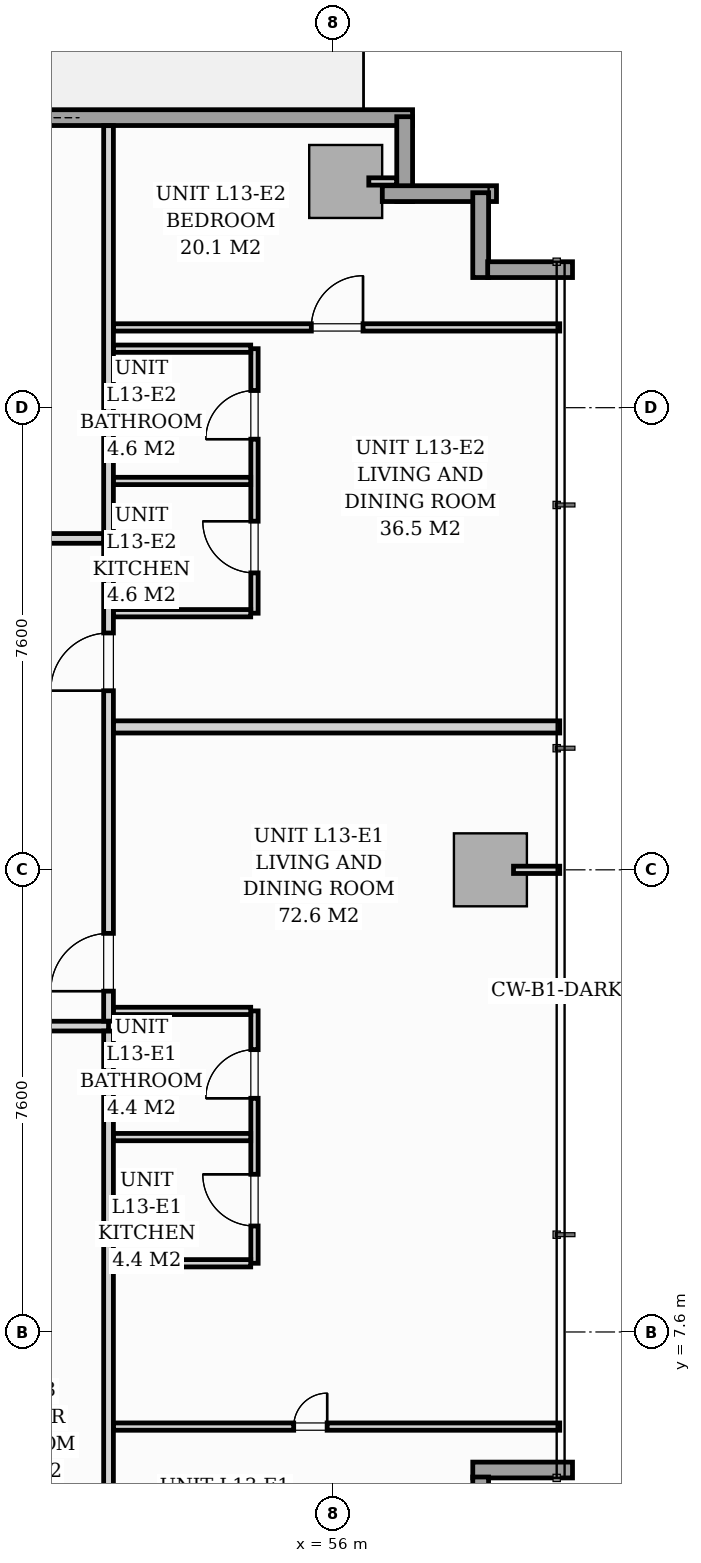
"""IFC4 building model, lengths in metres.
Left out: names, types, materials, properties, quantities, classifications, styles, units other than length and angle.
Written with IfcOpenShell. Run it as: python <this file> out.ifc"""

import sys

from ifc_helpers import new_model, si_unit, direction, frame, frame_2d, origin, origin_2d, place, context, subcontext, project, spatial, rectangle, extrude, source, transform, mapped, element, fill, save


model = new_model("IFC4")
c1 = context("Model", 3, precision=1e-05, world=origin(), true_north=direction((0.0, 1.0)))
c2 = subcontext(c1, "Body", "Model", "MODEL_VIEW")
j1 = project(units=[si_unit("LENGTHUNIT", "METRE"), si_unit("PLANEANGLEUNIT", "RADIAN")], contexts=[c1])
p1 = place(None, origin())
s1 = spatial("IfcSite", under=j1, at=p1, CompositionType="ELEMENT")
p2 = place(p1, origin())
s2 = spatial("IfcBuilding", under=s1, at=p2, CompositionType="ELEMENT")
p3 = place(p2, frame((0.0, 0.0, 48.6)))
s3 = spatial("IfcBuildingStorey", under=s2, at=p3, CompositionType="ELEMENT", Elevation=48.6)
m1 = source(origin(), c2, "Body", "SweptSolid", [
    extrude(rectangle(XDim=1.2, YDim=1.2, at=origin_2d()), origin(), (0.0, 0.0, 1.0), 3.196),
])
for number, where, z_axis, x_axis in (
    (1, (56.2, 26.52, 0.002), (0.0, 0.0, 1.0), (1.0, 0.0, 0.0)),
    (2, (58.58, 15.2, 0.002), (0.0, 0.0, 1.0), (1.0, 0.0, 0.0)),
):
    element("IfcColumn", number, at=place(p3, frame(where, z_axis=z_axis, x_axis=x_axis)), inside=s3, PredefinedType="COLUMN", context=c2, shape_type="MappedRepresentation", body=[
        mapped(m1, transform((0.0, 0.0, 0.0), scale=1.0)),
    ])
p4 = place(p3, frame((40.15, 27.57, 0.0), z_axis=(0.0, 0.0, 1.0), x_axis=(1.0, 0.0, 0.0)))
e3 = element("IfcWall", 3, at=p4, inside=s3, PredefinedType="STANDARD", context=c2, shape_type="SweptSolid", body=[
    extrude(rectangle(XDim=17.15, YDim=0.26, at=frame_2d((8.575, 0.0))), origin(), (0.0, 0.0, 1.0), 2.94),
])
p5 = place(p4, frame((9.06, 0.0, 0.0)))
e4 = element("IfcOpeningElement", 4, at=p5, cuts=e3, PredefinedType="OPENING", context=c2, shape_type="SweptSolid", body=[
    extrude(rectangle(XDim=1.8, YDim=2.06, at=frame_2d((0.9, 1.03))), frame((0.0, 0.14, 0.0), z_axis=(0.0, -1.0, 0.0), x_axis=(1.0, 0.0, 0.0)), (0.0, 0.0, 1.0), 0.28),
])
p6 = place(p4, frame((0.7, 0.0, 0.65)))
e5 = element("IfcOpeningElement", 5, at=p6, cuts=e3, PredefinedType="OPENING", context=c2, shape_type="SweptSolid", body=[
    extrude(rectangle(XDim=1.6, YDim=1.5, at=frame_2d((0.8, 0.75))), frame((0.0, 0.14, 0.0), z_axis=(0.0, -1.0, 0.0), x_axis=(1.0, 0.0, 0.0)), (0.0, 0.0, 1.0), 0.28),
])
p7 = place(p3, frame((57.17, 27.585, 0.0), z_axis=(0.0, 0.0, 1.0), x_axis=(0.0, -1.0, 0.0)))
e6 = element("IfcWall", 6, at=p7, inside=s3, PredefinedType="STANDARD", context=c2, shape_type="SweptSolid", body=[
    extrude(rectangle(XDim=1.395, YDim=0.26, at=frame_2d((0.698, 0.0))), origin(), (0.0, 0.0, 1.0), 2.94),
])
p8 = place(p3, frame((56.802, 26.32, 0.0), z_axis=(0.0, 0.0, 1.0), x_axis=(1.0, 0.0, 0.0)))
e7 = element("IfcWall", 7, at=p8, inside=s3, PredefinedType="STANDARD", context=c2, shape_type="SweptSolid", body=[
    extrude(rectangle(XDim=1.878, YDim=0.26, at=frame_2d((0.939, 0.0))), origin(), (0.0, 0.0, 1.0), 2.94),
])
for number, where, z_axis, x_axis in (
    (8, (58.42, 26.335, 0.0), (0.0, 0.0, 1.0), (0.0, -1.0, 0.0)),
    (9, (58.535, 25.07, 0.0), (0.0, 0.0, 1.0), (1.0, 0.0, 0.0)),
):
    element("IfcWall", number, at=place(p3, frame(where, z_axis=z_axis, x_axis=x_axis)), inside=s3, PredefinedType="STANDARD", context=c2, shape_type="SweptSolid", body=[
        extrude(rectangle(XDim=1.395, YDim=0.26, at=frame_2d((0.698, 0.0))), origin(), (0.0, 0.0, 1.0), 2.94),
    ])
p9 = place(p3, frame((59.93, 5.33, 0.0), z_axis=(0.0, 0.0, 1.0), x_axis=(-1.0, 0.0, 0.0)))
e10 = element("IfcWall", 10, at=p9, inside=s3, PredefinedType="STANDARD", context=c2, shape_type="SweptSolid", body=[
    extrude(rectangle(XDim=1.64, YDim=0.26, at=frame_2d((0.82, 0.0))), origin(), (0.0, 0.0, 1.0), 2.94),
])
p10 = place(p3, frame((58.42, 5.215, 0.0), z_axis=(0.0, 0.0, 1.0), x_axis=(0.0, -1.0, 0.0)))
e11 = element("IfcWall", 11, at=p10, inside=s3, PredefinedType="STANDARD", context=c2, shape_type="SweptSolid", body=[
    extrude(rectangle(XDim=1.15, YDim=0.26, at=frame_2d((0.575, 0.0))), origin(), (0.0, 0.0, 1.0), 2.94),
])
p11 = place(p3, frame((15.2, 12.63, 0.0), z_axis=(0.0, 0.0, 1.0), x_axis=(1.0, 0.0, 0.0)))
e12 = element("IfcWall", 12, at=p11, inside=s3, PredefinedType="PARTITIONING", context=c2, shape_type="SweptSolid", body=[
    extrude(rectangle(XDim=37.1, YDim=0.16, at=frame_2d((18.55, 0.0))), origin(), (0.0, 0.0, 1.0), 2.94),
])
p12 = place(p11, frame((1.572, 0.0, 0.0)))
e13 = element("IfcOpeningElement", 13, at=p12, cuts=e12, PredefinedType="OPENING", context=c2, shape_type="SweptSolid", body=[
    extrude(rectangle(XDim=0.95, YDim=2.06, at=frame_2d((0.475, 1.03))), frame((0.0, 0.09, 0.0), z_axis=(0.0, -1.0, 0.0), x_axis=(1.0, 0.0, 0.0)), (0.0, 0.0, 1.0), 0.18),
])
p13 = place(p11, frame((14.877, 0.0, 0.0)))
e14 = element("IfcOpeningElement", 14, at=p13, cuts=e12, PredefinedType="OPENING", context=c2, shape_type="SweptSolid", body=[
    extrude(rectangle(XDim=0.95, YDim=2.06, at=frame_2d((0.475, 1.03))), frame((0.0, 0.09, 0.0), z_axis=(0.0, -1.0, 0.0), x_axis=(1.0, 0.0, 0.0)), (0.0, 0.0, 1.0), 0.18),
])
p14 = place(p11, frame((28.476, 0.0, 0.0)))
e15 = element("IfcOpeningElement", 15, at=p14, cuts=e12, PredefinedType="OPENING", context=c2, shape_type="SweptSolid", body=[
    extrude(rectangle(XDim=0.95, YDim=2.06, at=frame_2d((0.475, 1.03))), frame((0.0, 0.09, 0.0), z_axis=(0.0, -1.0, 0.0), x_axis=(1.0, 0.0, 0.0)), (0.0, 0.0, 1.0), 0.18),
])
p15 = place(p3, frame((52.3, 2.962, 0.0), z_axis=(0.0, 0.0, 1.0), x_axis=(0.0, 1.0, 0.0)))
e16 = element("IfcWall", 16, at=p15, inside=s3, PredefinedType="PARTITIONING", context=c2, shape_type="SweptSolid", body=[
    extrude(rectangle(XDim=9.586, YDim=0.16, at=frame_2d((4.793, 0.0))), origin(), (0.0, 0.0, 1.0), 2.94),
])
p16 = place(p3, frame((52.3, 12.712, 0.0), z_axis=(0.0, 0.0, 1.0), x_axis=(0.0, 1.0, 0.0)))
e17 = element("IfcWall", 17, at=p16, inside=s3, PredefinedType="PARTITIONING", context=c2, shape_type="SweptSolid", body=[
    extrude(rectangle(XDim=14.726, YDim=0.16, at=frame_2d((7.363, 0.0))), origin(), (0.0, 0.0, 1.0), 2.94),
])
p17 = place(p16, frame((0.493, 0.0, 0.0)))
e18 = element("IfcOpeningElement", 18, at=p17, cuts=e17, PredefinedType="OPENING", context=c2, shape_type="SweptSolid", body=[
    extrude(rectangle(XDim=0.95, YDim=2.06, at=frame_2d((0.475, 1.03))), frame((0.0, 0.09, 0.0), z_axis=(0.0, -1.0, 0.0), x_axis=(1.0, 0.0, 0.0)), (0.0, 0.0, 1.0), 0.18),
])
p18 = place(p16, frame((5.433, 0.0, 0.0)))
e19 = element("IfcOpeningElement", 19, at=p18, cuts=e17, PredefinedType="OPENING", context=c2, shape_type="SweptSolid", body=[
    extrude(rectangle(XDim=0.95, YDim=2.06, at=frame_2d((0.475, 1.03))), frame((0.0, 0.09, 0.0), z_axis=(0.0, -1.0, 0.0), x_axis=(1.0, 0.0, 0.0)), (0.0, 0.0, 1.0), 0.18),
])
p19 = place(p3, frame((52.382, 17.55, 0.0), z_axis=(0.0, 0.0, 1.0), x_axis=(1.0, 0.0, 0.0)))
e20 = element("IfcWall", 20, at=p19, inside=s3, PredefinedType="PARTITIONING", context=c2, shape_type="SweptSolid", body=[
    extrude(rectangle(XDim=7.338, YDim=0.2, at=frame_2d((3.669, 0.0))), origin(), (0.0, 0.0, 1.0), 2.94),
])
p20 = place(p3, frame((54.7, 8.73, 0.0), z_axis=(0.0, 0.0, 1.0), x_axis=(0.0, 1.0, 0.0)))
e21 = element("IfcWall", 21, at=p20, inside=s3, PredefinedType="PARTITIONING", context=c2, shape_type="SweptSolid", body=[
    extrude(rectangle(XDim=4.15, YDim=0.12, at=frame_2d((2.075, 0.0))), origin(), (0.0, 0.0, 1.0), 2.94),
])
p21 = place(p20, frame((0.613, 0.0, 0.0)))
e22 = element("IfcOpeningElement", 22, at=p21, cuts=e21, PredefinedType="OPENING", context=c2, shape_type="SweptSolid", body=[
    extrude(rectangle(XDim=0.85, YDim=2.05, at=frame_2d((0.425, 1.025))), frame((0.0, 0.07, 0.0), z_axis=(0.0, -1.0, 0.0), x_axis=(1.0, 0.0, 0.0)), (0.0, 0.0, 1.0), 0.14),
])
p22 = place(p20, frame((2.713, 0.0, 0.0)))
e23 = element("IfcOpeningElement", 23, at=p22, cuts=e21, PredefinedType="OPENING", context=c2, shape_type="SweptSolid", body=[
    extrude(rectangle(XDim=0.8, YDim=2.02, at=frame_2d((0.4, 1.01))), frame((0.0, 0.07, 0.0), z_axis=(0.0, -1.0, 0.0), x_axis=(1.0, 0.0, 0.0)), (0.0, 0.0, 1.0), 0.14),
])
for number, where, z_axis, x_axis in (
    (24, (52.382, 10.805, 0.0), (0.0, 0.0, 1.0), (1.0, 0.0, 0.0)),
    (25, (52.382, 8.73, 0.0), (0.0, 0.0, 1.0), (1.0, 0.0, 0.0)),
    (26, (52.382, 12.88, 0.0), (0.0, 0.0, 1.0), (1.0, 0.0, 0.0)),
):
    element("IfcWall", number, at=place(p3, frame(where, z_axis=z_axis, x_axis=x_axis)), inside=s3, PredefinedType="PARTITIONING", context=c2, shape_type="SweptSolid", body=[
        extrude(rectangle(XDim=2.256, YDim=0.12, at=frame_2d((1.128, 0.0))), origin(), (0.0, 0.0, 1.0), 2.94),
    ])
p23 = place(p3, frame((52.382, 6.044, 0.0), z_axis=(0.0, 0.0, 1.0), x_axis=(1.0, 0.0, 0.0)))
e27 = element("IfcWall", 27, at=p23, inside=s3, PredefinedType="PARTITIONING", context=c2, shape_type="SweptSolid", body=[
    extrude(rectangle(XDim=7.338, YDim=0.12, at=frame_2d((3.669, 0.0))), origin(), (0.0, 0.0, 1.0), 2.94),
])
p24 = place(p23, frame((2.963, 0.0, 0.0)))
e28 = element("IfcOpeningElement", 28, at=p24, cuts=e27, PredefinedType="OPENING", context=c2, shape_type="SweptSolid", body=[
    extrude(rectangle(XDim=0.55, YDim=2.0, at=frame_2d((0.275, 1.0))), frame((0.0, 0.07, 0.0), z_axis=(0.0, -1.0, 0.0), x_axis=(1.0, 0.0, 0.0)), (0.0, 0.0, 1.0), 0.14),
])
p25 = place(p3, frame((54.7, 19.42, 0.0), z_axis=(0.0, 0.0, 1.0), x_axis=(0.0, 1.0, 0.0)))
e29 = element("IfcWall", 29, at=p25, inside=s3, PredefinedType="PARTITIONING", context=c2, shape_type="SweptSolid", body=[
    extrude(rectangle(XDim=4.35, YDim=0.12, at=frame_2d((2.175, 0.0))), origin(), (0.0, 0.0, 1.0), 2.94),
])
p26 = place(p25, frame((0.663, 0.0, 0.0)))
e30 = element("IfcOpeningElement", 30, at=p26, cuts=e29, PredefinedType="OPENING", context=c2, shape_type="SweptSolid", body=[
    extrude(rectangle(XDim=0.85, YDim=2.05, at=frame_2d((0.425, 1.025))), frame((0.0, 0.07, 0.0), z_axis=(0.0, -1.0, 0.0), x_axis=(1.0, 0.0, 0.0)), (0.0, 0.0, 1.0), 0.14),
])
p27 = place(p25, frame((2.862, 0.0, 0.0)))
e31 = element("IfcOpeningElement", 31, at=p27, cuts=e29, PredefinedType="OPENING", context=c2, shape_type="SweptSolid", body=[
    extrude(rectangle(XDim=0.8, YDim=2.02, at=frame_2d((0.4, 1.01))), frame((0.0, 0.07, 0.0), z_axis=(0.0, -1.0, 0.0), x_axis=(1.0, 0.0, 0.0)), (0.0, 0.0, 1.0), 0.14),
])
for number, where, z_axis, x_axis in (
    (32, (52.382, 21.595, 0.0), (0.0, 0.0, 1.0), (1.0, 0.0, 0.0)),
    (33, (52.382, 19.42, 0.0), (0.0, 0.0, 1.0), (1.0, 0.0, 0.0)),
    (34, (52.382, 23.77, 0.0), (0.0, 0.0, 1.0), (1.0, 0.0, 0.0)),
):
    element("IfcWall", number, at=place(p3, frame(where, z_axis=z_axis, x_axis=x_axis)), inside=s3, PredefinedType="PARTITIONING", context=c2, shape_type="SweptSolid", body=[
        extrude(rectangle(XDim=2.256, YDim=0.12, at=frame_2d((1.128, 0.0))), origin(), (0.0, 0.0, 1.0), 2.94),
    ])
p28 = place(p3, frame((52.382, 24.12, 0.0), z_axis=(0.0, 0.0, 1.0), x_axis=(1.0, 0.0, 0.0)))
e35 = element("IfcWall", 35, at=p28, inside=s3, PredefinedType="PARTITIONING", context=c2, shape_type="SweptSolid", body=[
    extrude(rectangle(XDim=7.338, YDim=0.12, at=frame_2d((3.669, 0.0))), origin(), (0.0, 0.0, 1.0), 2.94),
])
p29 = place(p28, frame((3.253, 0.0, 0.0)))
e36 = element("IfcOpeningElement", 36, at=p29, cuts=e35, PredefinedType="OPENING", context=c2, shape_type="SweptSolid", body=[
    extrude(rectangle(XDim=0.85, YDim=2.05, at=frame_2d((0.425, 1.025))), frame((0.0, 0.07, 0.0), z_axis=(0.0, -1.0, 0.0), x_axis=(1.0, 0.0, 0.0)), (0.0, 0.0, 1.0), 0.14),
])
p30 = place(p3, frame((50.432, 20.65, 0.0), z_axis=(0.0, 0.0, 1.0), x_axis=(1.0, 0.0, 0.0)))
e37 = element("IfcWall", 37, at=p30, inside=s3, PredefinedType="PARTITIONING", context=c2, shape_type="SweptSolid", body=[
    extrude(rectangle(XDim=1.786, YDim=0.16, at=frame_2d((0.893, 0.0))), origin(), (0.0, 0.0, 1.0), 2.94),
])
p31 = place(p3, frame((56.58, 26.52, 0.0), z_axis=(0.0, 0.0, 1.0), x_axis=(1.0, 0.0, 0.0)))
e38 = element("IfcWall", 38, at=p31, inside=s3, PredefinedType="PARTITIONING", context=c2, shape_type="SweptSolid", body=[
    extrude(rectangle(XDim=0.458, YDim=0.12, at=frame_2d((0.229, 0.0))), origin(), (0.0, 0.0, 1.0), 2.94),
])
p32 = place(p3, frame((58.96, 15.2, 0.0), z_axis=(0.0, 0.0, 1.0), x_axis=(1.0, 0.0, 0.0)))
e39 = element("IfcWall", 39, at=p32, inside=s3, PredefinedType="PARTITIONING", context=c2, shape_type="SweptSolid", body=[
    extrude(rectangle(XDim=0.76, YDim=0.12, at=frame_2d((0.38, 0.0))), origin(), (0.0, 0.0, 1.0), 2.94),
])
m2 = source(origin(), c2, "Body", "SweptSolid", [
    extrude(rectangle(XDim=0.95, YDim=2.06, at=frame_2d((0.475, 1.03))), frame((0.0, 0.025, 0.0), z_axis=(0.0, -1.0, 0.0), x_axis=(1.0, 0.0, 0.0)), (0.0, 0.0, 1.0), 0.05),
])
p33 = place(p17, origin())
e40 = element("IfcDoor", 40, at=p33, inside=s3, OperationType="SINGLE_SWING_LEFT", PredefinedType="DOOR", context=c2, shape_type="MappedRepresentation", body=[
    mapped(m2, transform((0.0, 0.0, 0.0), scale=1.0)),
])
fill(e18, e40)
m3 = source(origin(), c2, "Body", "SweptSolid", [
    extrude(rectangle(XDim=0.85, YDim=2.05, at=frame_2d((0.425, 1.025))), frame((0.0, 0.025, 0.0), z_axis=(0.0, -1.0, 0.0), x_axis=(1.0, 0.0, 0.0)), (0.0, 0.0, 1.0), 0.05),
])
p34 = place(p21, origin())
e41 = element("IfcDoor", 41, at=p34, inside=s3, OperationType="SINGLE_SWING_RIGHT", PredefinedType="DOOR", context=c2, shape_type="MappedRepresentation", body=[
    mapped(m3, transform((0.0, 0.0, 0.0), scale=1.0)),
])
fill(e22, e41)
m4 = source(origin(), c2, "Body", "SweptSolid", [
    extrude(rectangle(XDim=0.8, YDim=2.02, at=frame_2d((0.4, 1.01))), frame((0.0, 0.025, 0.0), z_axis=(0.0, -1.0, 0.0), x_axis=(1.0, 0.0, 0.0)), (0.0, 0.0, 1.0), 0.05),
])
p35 = place(p22, origin())
e42 = element("IfcDoor", 42, at=p35, inside=s3, OperationType="SINGLE_SWING_LEFT", PredefinedType="DOOR", context=c2, shape_type="MappedRepresentation", body=[
    mapped(m4, transform((0.0, 0.0, 0.0), scale=1.0)),
])
fill(e23, e42)
m5 = source(origin(), c2, "Body", "SweptSolid", [
    extrude(rectangle(XDim=0.55, YDim=2.0, at=frame_2d((0.275, 1.0))), frame((0.0, 0.025, 0.0), z_axis=(0.0, -1.0, 0.0), x_axis=(1.0, 0.0, 0.0)), (0.0, 0.0, 1.0), 0.05),
])
p36 = place(p24, origin())
e43 = element("IfcDoor", 43, at=p36, inside=s3, OperationType="SINGLE_SWING_RIGHT", PredefinedType="DOOR", context=c2, shape_type="MappedRepresentation", body=[
    mapped(m5, transform((0.0, 0.0, 0.0), scale=1.0)),
])
fill(e28, e43)
p37 = place(p18, origin())
e44 = element("IfcDoor", 44, at=p37, inside=s3, OperationType="SINGLE_SWING_LEFT", PredefinedType="DOOR", context=c2, shape_type="MappedRepresentation", body=[
    mapped(m2, transform((0.0, 0.0, 0.0), scale=1.0)),
])
fill(e19, e44)
p38 = place(p26, origin())
e45 = element("IfcDoor", 45, at=p38, inside=s3, OperationType="SINGLE_SWING_RIGHT", PredefinedType="DOOR", context=c2, shape_type="MappedRepresentation", body=[
    mapped(m3, transform((0.0, 0.0, 0.0), scale=1.0)),
])
fill(e30, e45)
p39 = place(p27, origin())
e46 = element("IfcDoor", 46, at=p39, inside=s3, OperationType="SINGLE_SWING_LEFT", PredefinedType="DOOR", context=c2, shape_type="MappedRepresentation", body=[
    mapped(m4, transform((0.0, 0.0, 0.0), scale=1.0)),
])
fill(e31, e46)
p40 = place(p29, origin())
e47 = element("IfcDoor", 47, at=p40, inside=s3, OperationType="SINGLE_SWING_RIGHT", PredefinedType="DOOR", context=c2, shape_type="MappedRepresentation", body=[
    mapped(m3, transform((0.0, 0.0, 0.0), scale=1.0)),
])
fill(e36, e47)
save(model, sys.argv[1])
